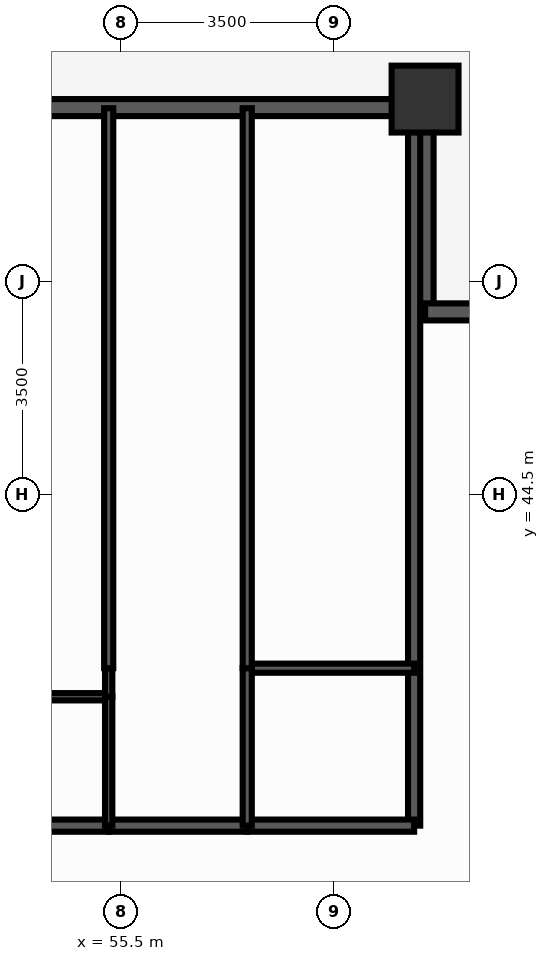
"""IFC4 building model, lengths in metres.
Left out: names, types, materials, properties, quantities, classifications, styles, units other than length and angle.
Written with IfcOpenShell. Run it as: python <this file> out.ifc"""

import sys

from ifc_helpers import new_model, si_unit, direction, frame, frame_2d, origin, origin_2d, place, context, subcontext, project, spatial, rectangle, extrude, source, transform, mapped, element, fill, save


model = new_model("IFC4")
c1 = context("Model", 3, precision=1e-05, world=origin(), true_north=direction((0.0, 1.0)))
c2 = subcontext(c1, "Body", "Model", "MODEL_VIEW")
j1 = project(units=[si_unit("LENGTHUNIT", "METRE"), si_unit("PLANEANGLEUNIT", "RADIAN")], contexts=[c1])
p1 = place(None, origin())
s1 = spatial("IfcSite", under=j1, at=p1, CompositionType="ELEMENT")
p2 = place(p1, origin())
s2 = spatial("IfcBuilding", under=s1, at=p2, CompositionType="ELEMENT")
p3 = place(p2, frame((0.0, 0.0, 19.4)))
s3 = spatial("IfcBuildingStorey", under=s2, at=p3, CompositionType="ELEMENT", Elevation=19.4)
m1 = source(origin(), c2, "Body", "SweptSolid", [
    extrude(rectangle(XDim=1.1, YDim=1.1, at=origin_2d()), origin(), (0.0, 0.0, 1.0), 3.0),
])
p4 = place(p3, frame((60.5, 51.0, 0.0), z_axis=(0.0, 0.0, 1.0), x_axis=(1.0, 0.0, 0.0)))
e1 = element("IfcColumn", 1, at=p4, inside=s3, PredefinedType="COLUMN", context=c2, shape_type="MappedRepresentation", body=[
    mapped(m1, transform((0.0, 0.0, 0.0), scale=1.0)),
])
p5 = place(p3, frame((15.5, 50.86, 0.0), z_axis=(0.0, 0.0, 1.0), x_axis=(1.0, 0.0, 0.0)))
e2 = element("IfcWall", 2, at=p5, inside=s3, PredefinedType="SOLIDWALL", context=c2, shape_type="SweptSolid", body=[
    extrude(rectangle(XDim=45.0, YDim=0.28, at=frame_2d((22.5, 0.0))), origin(), (0.0, 0.0, 1.0), 2.28),
])
p6 = place(p5, frame((0.76, 0.0, 0.25)))
e3 = element("IfcOpeningElement", 3, at=p6, cuts=e2, PredefinedType="OPENING", context=c2, shape_type="SweptSolid", body=[
    extrude(rectangle(XDim=1.2, YDim=1.5, at=frame_2d((0.6, 0.75))), frame((0.0, 0.152, 0.0), z_axis=(0.0, -1.0, 0.0), x_axis=(1.0, 0.0, 0.0)), (0.0, 0.0, 1.0), 0.304),
])
p7 = place(p5, frame((3.494, 0.0, 0.25)))
e4 = element("IfcOpeningElement", 4, at=p7, cuts=e2, PredefinedType="OPENING", context=c2, shape_type="SweptSolid", body=[
    extrude(rectangle(XDim=1.2, YDim=1.5, at=frame_2d((0.6, 0.75))), frame((0.0, 0.152, 0.0), z_axis=(0.0, -1.0, 0.0), x_axis=(1.0, 0.0, 0.0)), (0.0, 0.0, 1.0), 0.304),
])
p8 = place(p5, frame((8.741, 0.0, 0.25)))
e5 = element("IfcOpeningElement", 5, at=p8, cuts=e2, PredefinedType="OPENING", context=c2, shape_type="SweptSolid", body=[
    extrude(rectangle(XDim=1.2, YDim=1.5, at=frame_2d((0.6, 0.75))), frame((0.0, 0.152, 0.0), z_axis=(0.0, -1.0, 0.0), x_axis=(1.0, 0.0, 0.0)), (0.0, 0.0, 1.0), 0.304),
])
p9 = place(p5, frame((13.616, 0.0, 0.25)))
e6 = element("IfcOpeningElement", 6, at=p9, cuts=e2, PredefinedType="OPENING", context=c2, shape_type="SweptSolid", body=[
    extrude(rectangle(XDim=1.2, YDim=1.5, at=frame_2d((0.6, 0.75))), frame((0.0, 0.152, 0.0), z_axis=(0.0, -1.0, 0.0), x_axis=(1.0, 0.0, 0.0)), (0.0, 0.0, 1.0), 0.304),
])
p10 = place(p5, frame((17.146, 0.0, 0.25)))
e7 = element("IfcOpeningElement", 7, at=p10, cuts=e2, PredefinedType="OPENING", context=c2, shape_type="SweptSolid", body=[
    extrude(rectangle(XDim=1.2, YDim=1.5, at=frame_2d((0.6, 0.75))), frame((0.0, 0.152, 0.0), z_axis=(0.0, -1.0, 0.0), x_axis=(1.0, 0.0, 0.0)), (0.0, 0.0, 1.0), 0.304),
])
p11 = place(p5, frame((22.423, 0.0, 0.0)))
e8 = element("IfcOpeningElement", 8, at=p11, cuts=e2, PredefinedType="OPENING", context=c2, shape_type="SweptSolid", body=[
    extrude(rectangle(XDim=1.1, YDim=2.15, at=frame_2d((0.55, 1.075))), frame((0.0, 0.152, 0.0), z_axis=(0.0, -1.0, 0.0), x_axis=(1.0, 0.0, 0.0)), (0.0, 0.0, 1.0), 0.304),
])
p12 = place(p5, frame((27.252, 0.0, 0.25)))
e9 = element("IfcOpeningElement", 9, at=p12, cuts=e2, PredefinedType="OPENING", context=c2, shape_type="SweptSolid", body=[
    extrude(rectangle(XDim=0.95, YDim=1.5, at=frame_2d((0.475, 0.75))), frame((0.0, 0.152, 0.0), z_axis=(0.0, -1.0, 0.0), x_axis=(1.0, 0.0, 0.0)), (0.0, 0.0, 1.0), 0.304),
])
p13 = place(p5, frame((30.873, 0.0, 0.25)))
e10 = element("IfcOpeningElement", 10, at=p13, cuts=e2, PredefinedType="OPENING", context=c2, shape_type="SweptSolid", body=[
    extrude(rectangle(XDim=1.2, YDim=1.5, at=frame_2d((0.6, 0.75))), frame((0.0, 0.152, 0.0), z_axis=(0.0, -1.0, 0.0), x_axis=(1.0, 0.0, 0.0)), (0.0, 0.0, 1.0), 0.304),
])
p14 = place(p5, frame((33.113, 0.0, 0.25)))
e11 = element("IfcOpeningElement", 11, at=p14, cuts=e2, PredefinedType="OPENING", context=c2, shape_type="SweptSolid", body=[
    extrude(rectangle(XDim=1.2, YDim=1.5, at=frame_2d((0.6, 0.75))), frame((0.0, 0.152, 0.0), z_axis=(0.0, -1.0, 0.0), x_axis=(1.0, 0.0, 0.0)), (0.0, 0.0, 1.0), 0.304),
])
p15 = place(p5, frame((35.624, 0.0, 0.25)))
e12 = element("IfcOpeningElement", 12, at=p15, cuts=e2, PredefinedType="OPENING", context=c2, shape_type="SweptSolid", body=[
    extrude(rectangle(XDim=1.2, YDim=1.5, at=frame_2d((0.6, 0.75))), frame((0.0, 0.152, 0.0), z_axis=(0.0, -1.0, 0.0), x_axis=(1.0, 0.0, 0.0)), (0.0, 0.0, 1.0), 0.304),
])
p16 = place(p5, frame((38.097, 0.0, 0.25)))
e13 = element("IfcOpeningElement", 13, at=p16, cuts=e2, PredefinedType="OPENING", context=c2, shape_type="SweptSolid", body=[
    extrude(rectangle(XDim=1.2, YDim=1.5, at=frame_2d((0.6, 0.75))), frame((0.0, 0.152, 0.0), z_axis=(0.0, -1.0, 0.0), x_axis=(1.0, 0.0, 0.0)), (0.0, 0.0, 1.0), 0.304),
])
p17 = place(p5, frame((40.336, 0.0, 0.25)))
e14 = element("IfcOpeningElement", 14, at=p17, cuts=e2, PredefinedType="OPENING", context=c2, shape_type="SweptSolid", body=[
    extrude(rectangle(XDim=1.2, YDim=1.5, at=frame_2d((0.6, 0.75))), frame((0.0, 0.152, 0.0), z_axis=(0.0, -1.0, 0.0), x_axis=(1.0, 0.0, 0.0)), (0.0, 0.0, 1.0), 0.304),
])
p18 = place(p5, frame((42.743, 0.0, 0.25)))
e15 = element("IfcOpeningElement", 15, at=p18, cuts=e2, PredefinedType="OPENING", context=c2, shape_type="SweptSolid", body=[
    extrude(rectangle(XDim=1.2, YDim=1.5, at=frame_2d((0.6, 0.75))), frame((0.0, 0.152, 0.0), z_axis=(0.0, -1.0, 0.0), x_axis=(1.0, 0.0, 0.0)), (0.0, 0.0, 1.0), 0.304),
])
for number, where, z_axis, x_axis in (
    (16, (60.5, 47.5, 0.0), (0.0, 0.0, 1.0), (0.0, 1.0, 0.0)),
    (17, (60.5, 47.5, 0.0), (0.0, 0.0, 1.0), (1.0, 0.0, 0.0)),
):
    element("IfcWall", number, at=place(p3, frame(where, z_axis=z_axis, x_axis=x_axis)), inside=s3, PredefinedType="SOLIDWALL", context=c2, shape_type="SweptSolid", body=[
        extrude(rectangle(XDim=3.42, YDim=0.28, at=frame_2d((1.71, 0.0))), origin(), (0.0, 0.0, 1.0), 2.28),
    ])
p19 = place(p3, frame((60.32, 39.05, 0.0), z_axis=(0.0, 0.0, 1.0), x_axis=(0.0, 1.0, 0.0)))
e18 = element("IfcWall", 18, at=p19, inside=s3, PredefinedType="PARTITIONING", context=c2, shape_type="SweptSolid", body=[
    extrude(rectangle(XDim=11.8, YDim=0.2, at=frame_2d((5.9, 0.0))), origin(), (0.0, 0.0, 1.0), 2.79),
])
p20 = place(p3, frame((53.097, 39.05, 0.0), z_axis=(0.0, 0.0, 1.0), x_axis=(1.0, 0.0, 0.0)))
e19 = element("IfcWall", 19, at=p20, inside=s3, PredefinedType="PARTITIONING", context=c2, shape_type="SweptSolid", body=[
    extrude(rectangle(XDim=2.2, YDim=0.2, at=frame_2d((1.1, 0.0))), origin(), (0.0, 0.0, 1.0), 2.79),
])
p21 = place(p3, frame((55.297, 39.05, 0.0), z_axis=(0.0, 0.0, 1.0), x_axis=(1.0, 0.0, 0.0)))
e20 = element("IfcWall", 20, at=p21, inside=s3, PredefinedType="PARTITIONING", context=c2, shape_type="SweptSolid", body=[
    extrude(rectangle(XDim=2.279, YDim=0.2, at=frame_2d((1.139, 0.0))), origin(), (0.0, 0.0, 1.0), 2.79),
])
p22 = place(p21, frame((0.639, 0.0, 0.0)))
e21 = element("IfcOpeningElement", 21, at=p22, cuts=e20, PredefinedType="OPENING", context=c2, shape_type="SweptSolid", body=[
    extrude(rectangle(XDim=1.0, YDim=2.15, at=frame_2d((0.5, 1.075))), frame((0.0, 0.112, 0.0), z_axis=(0.0, -1.0, 0.0), x_axis=(1.0, 0.0, 0.0)), (0.0, 0.0, 1.0), 0.224),
])
p23 = place(p3, frame((57.575, 39.05, 0.0), z_axis=(0.0, 0.0, 1.0), x_axis=(1.0, 0.0, 0.0)))
e22 = element("IfcWall", 22, at=p23, inside=s3, PredefinedType="PARTITIONING", context=c2, shape_type="SweptSolid", body=[
    extrude(rectangle(XDim=2.745, YDim=0.2, at=frame_2d((1.373, 0.0))), origin(), (0.0, 0.0, 1.0), 2.79),
])
p24 = place(p3, frame((53.097, 41.17, 0.0), z_axis=(0.0, 0.0, 1.0), x_axis=(1.0, 0.0, 0.0)))
e23 = element("IfcWall", 23, at=p24, inside=s3, PredefinedType="PARTITIONING", context=c2, shape_type="SweptSolid", body=[
    extrude(rectangle(XDim=2.2, YDim=0.12, at=frame_2d((1.1, 0.0))), origin(), (0.0, 0.0, 1.0), 2.79),
])
p25 = place(p3, frame((57.575, 41.64, 0.0), z_axis=(0.0, 0.0, 1.0), x_axis=(1.0, 0.0, 0.0)))
e24 = element("IfcWall", 24, at=p25, inside=s3, PredefinedType="PARTITIONING", context=c2, shape_type="SweptSolid", body=[
    extrude(rectangle(XDim=2.745, YDim=0.15, at=frame_2d((1.373, 0.0))), origin(), (0.0, 0.0, 1.0), 2.79),
])
p26 = place(p3, frame((55.297, 39.05, 0.0), z_axis=(0.0, 0.0, 1.0), x_axis=(0.0, 1.0, 0.0)))
e25 = element("IfcWall", 25, at=p26, inside=s3, PredefinedType="PARTITIONING", context=c2, shape_type="SweptSolid", body=[
    extrude(rectangle(XDim=2.12, YDim=0.12, at=frame_2d((1.06, 0.0))), origin(), (0.0, 0.0, 1.0), 2.79),
])
p27 = place(p26, frame((0.635, 0.0, 0.0)))
e26 = element("IfcOpeningElement", 26, at=p27, cuts=e25, PredefinedType="OPENING", context=c2, shape_type="SweptSolid", body=[
    extrude(rectangle(XDim=0.85, YDim=2.05, at=frame_2d((0.425, 1.025))), frame((0.0, 0.072, 0.0), z_axis=(0.0, -1.0, 0.0), x_axis=(1.0, 0.0, 0.0)), (0.0, 0.0, 1.0), 0.144),
])
p28 = place(p3, frame((55.297, 41.17, 0.0), z_axis=(0.0, 0.0, 1.0), x_axis=(0.0, 1.0, 0.0)))
e27 = element("IfcWall", 27, at=p28, inside=s3, PredefinedType="PARTITIONING", context=c2, shape_type="SweptSolid", body=[
    extrude(rectangle(XDim=0.47, YDim=0.12, at=frame_2d((0.235, 0.0))), origin(), (0.0, 0.0, 1.0), 2.79),
])
p29 = place(p3, frame((55.297, 41.64, 0.0), z_axis=(0.0, 0.0, 1.0), x_axis=(0.0, 1.0, 0.0)))
e28 = element("IfcWall", 28, at=p29, inside=s3, PredefinedType="PARTITIONING", context=c2, shape_type="SweptSolid", body=[
    extrude(rectangle(XDim=9.21, YDim=0.15, at=frame_2d((4.605, 0.0))), origin(), (0.0, 0.0, 1.0), 2.79),
])
p30 = place(p29, frame((3.829, 0.0, 0.0)))
e29 = element("IfcOpeningElement", 29, at=p30, cuts=e28, PredefinedType="OPENING", context=c2, shape_type="SweptSolid", body=[
    extrude(rectangle(XDim=0.9, YDim=2.1, at=frame_2d((0.45, 1.05))), frame((0.0, 0.087, 0.0), z_axis=(0.0, -1.0, 0.0), x_axis=(1.0, 0.0, 0.0)), (0.0, 0.0, 1.0), 0.174),
])
p31 = place(p3, frame((57.575, 39.05, 0.0), z_axis=(0.0, 0.0, 1.0), x_axis=(0.0, 1.0, 0.0)))
e30 = element("IfcWall", 30, at=p31, inside=s3, PredefinedType="PARTITIONING", context=c2, shape_type="SweptSolid", body=[
    extrude(rectangle(XDim=2.59, YDim=0.15, at=frame_2d((1.295, 0.0))), origin(), (0.0, 0.0, 1.0), 2.79),
])
p32 = place(p31, frame((0.845, 0.0, 0.0)))
e31 = element("IfcOpeningElement", 31, at=p32, cuts=e30, PredefinedType="OPENING", context=c2, shape_type="SweptSolid", body=[
    extrude(rectangle(XDim=0.9, YDim=2.1, at=frame_2d((0.45, 1.05))), frame((0.0, 0.087, 0.0), z_axis=(0.0, -1.0, 0.0), x_axis=(1.0, 0.0, 0.0)), (0.0, 0.0, 1.0), 0.174),
])
p33 = place(p3, frame((57.575, 41.64, 0.0), z_axis=(0.0, 0.0, 1.0), x_axis=(0.0, 1.0, 0.0)))
e32 = element("IfcWall", 32, at=p33, inside=s3, PredefinedType="PARTITIONING", context=c2, shape_type="SweptSolid", body=[
    extrude(rectangle(XDim=9.21, YDim=0.15, at=frame_2d((4.605, 0.0))), origin(), (0.0, 0.0, 1.0), 2.79),
])
p34 = place(p33, frame((3.829, 0.0, 0.0)))
e33 = element("IfcOpeningElement", 33, at=p34, cuts=e32, PredefinedType="OPENING", context=c2, shape_type="SweptSolid", body=[
    extrude(rectangle(XDim=0.9, YDim=2.1, at=frame_2d((0.45, 1.05))), frame((0.0, 0.087, 0.0), z_axis=(0.0, -1.0, 0.0), x_axis=(1.0, 0.0, 0.0)), (0.0, 0.0, 1.0), 0.174),
])
m2 = source(origin(), c2, "Body", "SweptSolid", [
    extrude(rectangle(XDim=1.2, YDim=1.5, at=frame_2d((0.6, 0.75))), frame((0.0, 0.03, 0.0), z_axis=(0.0, -1.0, 0.0), x_axis=(1.0, 0.0, 0.0)), (0.0, 0.0, 1.0), 0.06),
])
p35 = place(p16, origin())
e34 = element("IfcWindow", 34, at=p35, inside=s3, PartitioningType="SINGLE_PANEL", PredefinedType="WINDOW", context=c2, shape_type="MappedRepresentation", body=[
    mapped(m2, transform((0.0, 0.0, 0.0), scale=1.0)),
])
fill(e13, e34)
p36 = place(p17, origin())
e35 = element("IfcWindow", 35, at=p36, inside=s3, PartitioningType="SINGLE_PANEL", PredefinedType="WINDOW", context=c2, shape_type="MappedRepresentation", body=[
    mapped(m2, transform((0.0, 0.0, 0.0), scale=1.0)),
])
fill(e14, e35)
p37 = place(p18, origin())
e36 = element("IfcWindow", 36, at=p37, inside=s3, PartitioningType="SINGLE_PANEL", PredefinedType="WINDOW", context=c2, shape_type="MappedRepresentation", body=[
    mapped(m2, transform((0.0, 0.0, 0.0), scale=1.0)),
])
fill(e15, e36)
m3 = source(origin(), c2, "Body", "SweptSolid", [
    extrude(rectangle(XDim=1.0, YDim=2.15, at=frame_2d((0.5, 1.075))), frame((0.0, 0.025, 0.0), z_axis=(0.0, -1.0, 0.0), x_axis=(1.0, 0.0, 0.0)), (0.0, 0.0, 1.0), 0.05),
])
p38 = place(p22, origin())
e37 = element("IfcDoor", 37, at=p38, inside=s3, OperationType="SINGLE_SWING_LEFT", PredefinedType="DOOR", context=c2, shape_type="MappedRepresentation", body=[
    mapped(m3, transform((0.0, 0.0, 0.0), scale=1.0)),
])
fill(e21, e37)
m4 = source(origin(), c2, "Body", "SweptSolid", [
    extrude(rectangle(XDim=0.85, YDim=2.05, at=frame_2d((0.425, 1.025))), frame((0.0, 0.025, 0.0), z_axis=(0.0, -1.0, 0.0), x_axis=(1.0, 0.0, 0.0)), (0.0, 0.0, 1.0), 0.05),
])
p39 = place(p27, origin())
e38 = element("IfcDoor", 38, at=p39, inside=s3, OperationType="SINGLE_SWING_RIGHT", PredefinedType="DOOR", context=c2, shape_type="MappedRepresentation", body=[
    mapped(m4, transform((0.0, 0.0, 0.0), scale=1.0)),
])
fill(e26, e38)
m5 = source(origin(), c2, "Body", "SweptSolid", [
    extrude(rectangle(XDim=0.9, YDim=2.1, at=frame_2d((0.45, 1.05))), frame((0.0, 0.025, 0.0), z_axis=(0.0, -1.0, 0.0), x_axis=(1.0, 0.0, 0.0)), (0.0, 0.0, 1.0), 0.05),
])
p40 = place(p30, origin())
e39 = element("IfcDoor", 39, at=p40, inside=s3, OperationType="SINGLE_SWING_LEFT", PredefinedType="DOOR", context=c2, shape_type="MappedRepresentation", body=[
    mapped(m5, transform((0.0, 0.0, 0.0), scale=1.0)),
])
fill(e29, e39)
p41 = place(p32, origin())
e40 = element("IfcDoor", 40, at=p41, inside=s3, OperationType="SINGLE_SWING_RIGHT", PredefinedType="DOOR", context=c2, shape_type="MappedRepresentation", body=[
    mapped(m5, transform((0.0, 0.0, 0.0), scale=1.0)),
])
fill(e31, e40)
p42 = place(p34, origin())
e41 = element("IfcDoor", 41, at=p42, inside=s3, OperationType="SINGLE_SWING_LEFT", PredefinedType="DOOR", context=c2, shape_type="MappedRepresentation", body=[
    mapped(m5, transform((0.0, 0.0, 0.0), scale=1.0)),
])
fill(e33, e41)
save(model, sys.argv[1])
